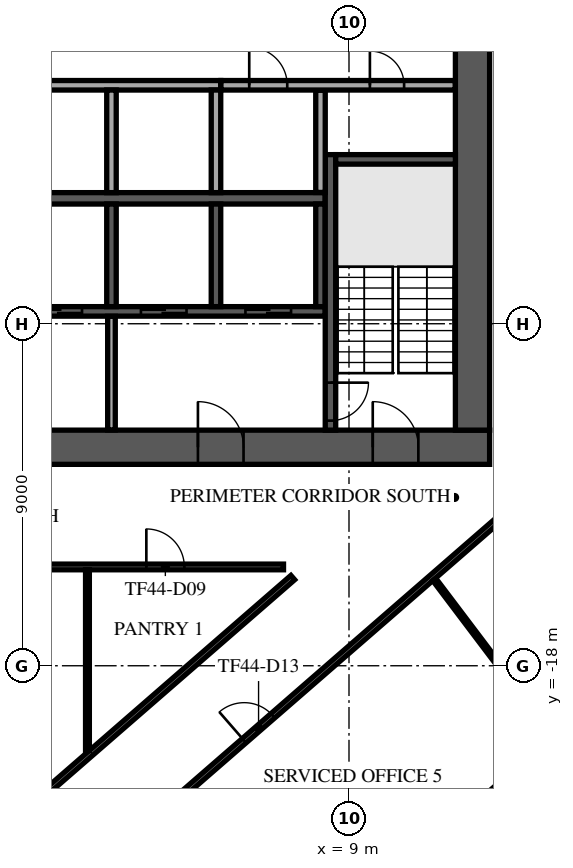
"""IFC4 building model, lengths in metres.
Left out: names, types, materials, properties, quantities, classifications, styles, units other than length and angle.
Written with IfcOpenShell. Run it as: python <this file> out.ifc"""

import sys

from ifc_helpers import new_model, si_unit, direction, frame, frame_2d, origin, place, context, subcontext, project, spatial, rectangle, extrude, element, fill, save


model = new_model("IFC4")
c1 = context("Model", 3, precision=1e-05, world=origin(), true_north=direction((0.0, 1.0)))
c2 = subcontext(c1, "Body", "Model", "MODEL_VIEW")
j1 = project(units=[si_unit("LENGTHUNIT", "METRE"), si_unit("PLANEANGLEUNIT", "RADIAN")], contexts=[c1])
p1 = place(None, origin())
s1 = spatial("IfcSite", under=j1, at=p1, CompositionType="ELEMENT")
p2 = place(p1, origin())
s2 = spatial("IfcBuilding", under=s1, at=p2, CompositionType="ELEMENT")
p3 = place(p2, frame((0.0, 0.0, 193.3)))
s3 = spatial("IfcBuildingStorey", under=s2, at=p3, CompositionType="ELEMENT", Elevation=193.3)
p4 = place(p3, frame((-12.7, -12.25, 0.0), z_axis=(0.0, 0.0, 1.0), x_axis=(1.0, 0.0, 0.0)))
e1 = element("IfcWall", 1, at=p4, inside=s3, PredefinedType="SHEAR", context=c2, shape_type="SweptSolid", body=[
    extrude(rectangle(XDim=25.4, YDim=0.9, at=frame_2d((12.7, 0.0))), origin(), (0.0, 0.0, 1.0), 3.62),
])
p5 = place(p4, frame((7.6, 0.0, 0.0)))
e2 = element("IfcOpeningElement", 2, at=p5, cuts=e1, PredefinedType="OPENING", context=c2, shape_type="SweptSolid", body=[
    extrude(rectangle(XDim=2.0, YDim=2.1, at=frame_2d((1.0, 1.05))), frame((0.0, 0.46, 0.0), z_axis=(0.0, -1.0, 0.0), x_axis=(1.0, 0.0, 0.0)), (0.0, 0.0, 1.0), 0.92),
])
p6 = place(p4, frame((17.725, 0.0, 0.0)))
e3 = element("IfcOpeningElement", 3, at=p6, cuts=e1, PredefinedType="OPENING", context=c2, shape_type="SweptSolid", body=[
    extrude(rectangle(XDim=1.2, YDim=2.1, at=frame_2d((0.6, 1.05))), frame((0.0, 0.46, 0.0), z_axis=(0.0, -1.0, 0.0), x_axis=(1.0, 0.0, 0.0)), (0.0, 0.0, 1.0), 0.92),
])
p7 = place(p4, frame((1.875, 0.0, 0.0)))
e4 = element("IfcOpeningElement", 4, at=p7, cuts=e1, PredefinedType="OPENING", context=c2, shape_type="SweptSolid", body=[
    extrude(rectangle(XDim=1.2, YDim=2.1, at=frame_2d((0.6, 1.05))), frame((0.0, 0.46, 0.0), z_axis=(0.0, -1.0, 0.0), x_axis=(1.0, 0.0, 0.0)), (0.0, 0.0, 1.0), 0.92),
])
p8 = place(p4, frame((22.325, 0.0, 0.0)))
e5 = element("IfcOpeningElement", 5, at=p8, cuts=e1, PredefinedType="OPENING", context=c2, shape_type="SweptSolid", body=[
    extrude(rectangle(XDim=1.2, YDim=2.1, at=frame_2d((0.6, 1.05))), frame((0.0, 0.46, 0.0), z_axis=(0.0, -1.0, 0.0), x_axis=(1.0, 0.0, 0.0)), (0.0, 0.0, 1.0), 0.92),
])
p9 = place(p3, frame((12.25, -11.8, 0.0), z_axis=(0.0, 0.0, 1.0), x_axis=(0.0, 1.0, 0.0)))
e6 = element("IfcWall", 6, at=p9, inside=s3, PredefinedType="SHEAR", context=c2, shape_type="SweptSolid", body=[
    extrude(rectangle(XDim=23.6, YDim=0.9, at=frame_2d((11.8, 0.0))), origin(), (0.0, 0.0, 1.0), 3.62),
])
p10 = place(p9, frame((10.6, 0.0, 0.0)))
e7 = element("IfcOpeningElement", 7, at=p10, cuts=e6, PredefinedType="OPENING", context=c2, shape_type="SweptSolid", body=[
    extrude(rectangle(XDim=2.4, YDim=2.4, at=frame_2d((1.2, 1.2))), frame((0.0, 0.46, 0.0), z_axis=(0.0, -1.0, 0.0), x_axis=(1.0, 0.0, 0.0)), (0.0, 0.0, 1.0), 0.92),
])
p11 = place(p3, frame((-2.875, -5.7, 0.0), z_axis=(0.0, 0.0, 1.0), x_axis=(1.0, 0.0, 0.0)))
e8 = element("IfcWall", 8, at=p11, inside=s3, PredefinedType="SOLIDWALL", context=c2, shape_type="SweptSolid", body=[
    extrude(rectangle(XDim=11.25, YDim=0.3, at=frame_2d((5.625, 0.0))), origin(), (0.0, 0.0, 1.0), 3.62),
])
p12 = place(p3, frame((-2.875, -2.725, 0.0), z_axis=(0.0, 0.0, 1.0), x_axis=(1.0, 0.0, 0.0)))
e9 = element("IfcWall", 9, at=p12, inside=s3, PredefinedType="SOLIDWALL", context=c2, shape_type="SweptSolid", body=[
    extrude(rectangle(XDim=8.5, YDim=0.25, at=frame_2d((4.25, 0.0))), origin(), (0.0, 0.0, 1.0), 3.62),
])
for number, where, z_axis, x_axis in (
    (10, (2.75, -5.55, 0.0), (0.0, 0.0, 1.0), (0.0, 1.0, 0.0)),
    (11, (5.5, -5.55, 0.0), (0.0, 0.0, 1.0), (0.0, 1.0, 0.0)),
):
    element("IfcWall", number, at=place(p3, frame(where, z_axis=z_axis, x_axis=x_axis)), inside=s3, PredefinedType="SOLIDWALL", context=c2, shape_type="SweptSolid", body=[
        extrude(rectangle(XDim=2.7, YDim=0.25, at=frame_2d((1.35, 0.0))), origin(), (0.0, 0.0, 1.0), 3.62),
    ])
p13 = place(p3, frame((-2.875, -8.675, 0.0), z_axis=(0.0, 0.0, 1.0), x_axis=(1.0, 0.0, 0.0)))
e12 = element("IfcWall", 12, at=p13, inside=s3, PredefinedType="SOLIDWALL", context=c2, shape_type="SweptSolid", body=[
    extrude(rectangle(XDim=11.25, YDim=0.25, at=frame_2d((5.625, 0.0))), origin(), (0.0, 0.0, 1.0), 3.62),
])
p14 = place(p13, frame((0.9, 0.0, 0.0)))
e13 = element("IfcOpeningElement", 13, at=p14, cuts=e12, PredefinedType="OPENING", context=c2, shape_type="SweptSolid", body=[
    extrude(rectangle(XDim=1.2, YDim=2.1, at=frame_2d((0.6, 1.05))), frame((0.0, 0.135, 0.0), z_axis=(0.0, -1.0, 0.0), x_axis=(1.0, 0.0, 0.0)), (0.0, 0.0, 1.0), 0.27),
])
p15 = place(p13, frame((3.65, 0.0, 0.0)))
e14 = element("IfcOpeningElement", 14, at=p15, cuts=e12, PredefinedType="OPENING", context=c2, shape_type="SweptSolid", body=[
    extrude(rectangle(XDim=1.2, YDim=2.1, at=frame_2d((0.6, 1.05))), frame((0.0, 0.135, 0.0), z_axis=(0.0, -1.0, 0.0), x_axis=(1.0, 0.0, 0.0)), (0.0, 0.0, 1.0), 0.27),
])
p16 = place(p13, frame((6.4, 0.0, 0.0)))
e15 = element("IfcOpeningElement", 15, at=p16, cuts=e12, PredefinedType="OPENING", context=c2, shape_type="SweptSolid", body=[
    extrude(rectangle(XDim=1.2, YDim=2.1, at=frame_2d((0.6, 1.05))), frame((0.0, 0.135, 0.0), z_axis=(0.0, -1.0, 0.0), x_axis=(1.0, 0.0, 0.0)), (0.0, 0.0, 1.0), 0.27),
])
p17 = place(p13, frame((9.15, 0.0, 0.0)))
e16 = element("IfcOpeningElement", 16, at=p17, cuts=e12, PredefinedType="OPENING", context=c2, shape_type="SweptSolid", body=[
    extrude(rectangle(XDim=1.2, YDim=2.1, at=frame_2d((0.6, 1.05))), frame((0.0, 0.135, 0.0), z_axis=(0.0, -1.0, 0.0), x_axis=(1.0, 0.0, 0.0)), (0.0, 0.0, 1.0), 0.27),
])
for number, where, z_axis, x_axis in (
    (17, (2.75, -8.55, 0.0), (0.0, 0.0, 1.0), (0.0, 1.0, 0.0)),
    (18, (5.5, -8.55, 0.0), (0.0, 0.0, 1.0), (0.0, 1.0, 0.0)),
    (19, (8.25, -8.55, 0.0), (0.0, 0.0, 1.0), (0.0, 1.0, 0.0)),
):
    element("IfcWall", number, at=place(p3, frame(where, z_axis=z_axis, x_axis=x_axis)), inside=s3, PredefinedType="SOLIDWALL", context=c2, shape_type="SweptSolid", body=[
        extrude(rectangle(XDim=2.7, YDim=0.25, at=frame_2d((1.35, 0.0))), origin(), (0.0, 0.0, 1.0), 3.62),
    ])
p18 = place(p3, frame((8.512, -4.55, 0.0), z_axis=(0.0, 0.0, 1.0), x_axis=(0.0, -1.0, 0.0)))
e20 = element("IfcWall", 20, at=p18, inside=s3, PredefinedType="SOLIDWALL", context=c2, shape_type="SweptSolid", body=[
    extrude(rectangle(XDim=7.25, YDim=0.275, at=frame_2d((3.625, 0.0))), origin(), (0.0, 0.0, 1.0), 3.62),
])
p19 = place(p18, frame((6.0, 0.0, 0.0)))
e21 = element("IfcOpeningElement", 21, at=p19, cuts=e20, PredefinedType="OPENING", context=c2, shape_type="SweptSolid", body=[
    extrude(rectangle(XDim=1.0, YDim=2.1, at=frame_2d((0.5, 1.05))), frame((0.0, 0.147, 0.0), z_axis=(0.0, -1.0, 0.0), x_axis=(1.0, 0.0, 0.0)), (0.0, 0.0, 1.0), 0.295),
])
p20 = place(p3, frame((8.65, -4.675, 0.0), z_axis=(0.0, 0.0, 1.0), x_axis=(1.0, 0.0, 0.0)))
e22 = element("IfcWall", 22, at=p20, inside=s3, PredefinedType="SOLIDWALL", context=c2, shape_type="SweptSolid", body=[
    extrude(rectangle(XDim=3.15, YDim=0.25, at=frame_2d((1.575, 0.0))), origin(), (0.0, 0.0, 1.0), 3.62),
])
p21 = place(p3, frame((2.75, -11.795, 0.0), z_axis=(0.0, 0.0, 1.0), x_axis=(0.0, 1.0, 0.0)))
e23 = element("IfcWall", 23, at=p21, inside=s3, PredefinedType="PARTITIONING", context=c2, shape_type="SweptSolid", body=[
    extrude(rectangle(XDim=2.99, YDim=0.2, at=frame_2d((1.495, 0.0))), origin(), (0.0, 0.0, 1.0), 3.62),
])
p22 = place(p3, frame((8.25, -5.545, 0.0), z_axis=(0.0, 0.0, 1.0), x_axis=(0.0, 1.0, 0.0)))
e24 = element("IfcWall", 24, at=p22, inside=s3, PredefinedType="PARTITIONING", context=c2, shape_type="SweptSolid", body=[
    extrude(rectangle(XDim=2.69, YDim=0.25, at=frame_2d((1.345, 0.0))), origin(), (0.0, 0.0, 1.0), 3.62),
])
p23 = place(p3, frame((5.63, -2.725, 0.0), z_axis=(0.0, 0.0, 1.0), x_axis=(1.0, 0.0, 0.0)))
e25 = element("IfcWall", 25, at=p23, inside=s3, PredefinedType="PARTITIONING", context=c2, shape_type="SweptSolid", body=[
    extrude(rectangle(XDim=6.165, YDim=0.25, at=frame_2d((3.083, 0.0))), origin(), (0.0, 0.0, 1.0), 3.62),
])
p24 = place(p23, frame((0.745, 0.0, 0.0)))
e26 = element("IfcOpeningElement", 26, at=p24, cuts=e25, PredefinedType="OPENING", context=c2, shape_type="SweptSolid", body=[
    extrude(rectangle(XDim=1.0, YDim=2.1, at=frame_2d((0.5, 1.05))), frame((0.0, 0.135, 0.0), z_axis=(0.0, -1.0, 0.0), x_axis=(1.0, 0.0, 0.0)), (0.0, 0.0, 1.0), 0.27),
])
p25 = place(p23, frame((3.92, 0.0, 0.0)))
e27 = element("IfcOpeningElement", 27, at=p25, cuts=e25, PredefinedType="OPENING", context=c2, shape_type="SweptSolid", body=[
    extrude(rectangle(XDim=0.9, YDim=2.1, at=frame_2d((0.45, 1.05))), frame((0.0, 0.135, 0.0), z_axis=(0.0, -1.0, 0.0), x_axis=(1.0, 0.0, 0.0)), (0.0, 0.0, 1.0), 0.27),
])
p26 = place(p3, frame((-2.286, -34.715, 0.0), z_axis=(0.0, 0.0, 1.0), x_axis=(0.754708272811, 0.656060532993, 0.0)))
e28 = element("IfcWall", 28, at=p26, inside=s3, PredefinedType="STANDARD", context=c2, shape_type="SweptSolid", body=[
    extrude(rectangle(XDim=49.0, YDim=0.6, at=frame_2d((24.5, 0.0))), origin(), (0.0, 0.0, 1.0), 3.62),
])
p27 = place(p26, frame((1.227, 0.0, 0.9)))
e29 = element("IfcOpeningElement", 29, at=p27, cuts=e28, PredefinedType="OPENING", context=c2, shape_type="SweptSolid", body=[
    extrude(rectangle(XDim=2.0, YDim=2.1, at=frame_2d((1.0, 1.05))), frame((0.0, 0.31, 0.0), z_axis=(0.0, -1.0, 0.0), x_axis=(1.0, 0.0, 0.0)), (0.0, 0.0, 1.0), 0.62),
])
p28 = place(p26, frame((5.682, 0.0, 0.9)))
e30 = element("IfcOpeningElement", 30, at=p28, cuts=e28, PredefinedType="OPENING", context=c2, shape_type="SweptSolid", body=[
    extrude(rectangle(XDim=2.0, YDim=2.1, at=frame_2d((1.0, 1.05))), frame((0.0, 0.31, 0.0), z_axis=(0.0, -1.0, 0.0), x_axis=(1.0, 0.0, 0.0)), (0.0, 0.0, 1.0), 0.62),
])
p29 = place(p26, frame((10.136, 0.0, 0.9)))
e31 = element("IfcOpeningElement", 31, at=p29, cuts=e28, PredefinedType="OPENING", context=c2, shape_type="SweptSolid", body=[
    extrude(rectangle(XDim=2.0, YDim=2.1, at=frame_2d((1.0, 1.05))), frame((0.0, 0.31, 0.0), z_axis=(0.0, -1.0, 0.0), x_axis=(1.0, 0.0, 0.0)), (0.0, 0.0, 1.0), 0.62),
])
p30 = place(p26, frame((14.591, 0.0, 0.9)))
e32 = element("IfcOpeningElement", 32, at=p30, cuts=e28, PredefinedType="OPENING", context=c2, shape_type="SweptSolid", body=[
    extrude(rectangle(XDim=2.0, YDim=2.1, at=frame_2d((1.0, 1.05))), frame((0.0, 0.31, 0.0), z_axis=(0.0, -1.0, 0.0), x_axis=(1.0, 0.0, 0.0)), (0.0, 0.0, 1.0), 0.62),
])
p31 = place(p26, frame((19.045, 0.0, 0.9)))
e33 = element("IfcOpeningElement", 33, at=p31, cuts=e28, PredefinedType="OPENING", context=c2, shape_type="SweptSolid", body=[
    extrude(rectangle(XDim=2.0, YDim=2.1, at=frame_2d((1.0, 1.05))), frame((0.0, 0.31, 0.0), z_axis=(0.0, -1.0, 0.0), x_axis=(1.0, 0.0, 0.0)), (0.0, 0.0, 1.0), 0.62),
])
p32 = place(p26, frame((23.5, 0.0, 0.9)))
e34 = element("IfcOpeningElement", 34, at=p32, cuts=e28, PredefinedType="OPENING", context=c2, shape_type="SweptSolid", body=[
    extrude(rectangle(XDim=2.0, YDim=2.1, at=frame_2d((1.0, 1.05))), frame((0.0, 0.31, 0.0), z_axis=(0.0, -1.0, 0.0), x_axis=(1.0, 0.0, 0.0)), (0.0, 0.0, 1.0), 0.62),
])
p33 = place(p26, frame((27.955, 0.0, 0.9)))
e35 = element("IfcOpeningElement", 35, at=p33, cuts=e28, PredefinedType="OPENING", context=c2, shape_type="SweptSolid", body=[
    extrude(rectangle(XDim=2.0, YDim=2.1, at=frame_2d((1.0, 1.05))), frame((0.0, 0.31, 0.0), z_axis=(0.0, -1.0, 0.0), x_axis=(1.0, 0.0, 0.0)), (0.0, 0.0, 1.0), 0.62),
])
p34 = place(p26, frame((32.409, 0.0, 0.9)))
e36 = element("IfcOpeningElement", 36, at=p34, cuts=e28, PredefinedType="OPENING", context=c2, shape_type="SweptSolid", body=[
    extrude(rectangle(XDim=2.0, YDim=2.1, at=frame_2d((1.0, 1.05))), frame((0.0, 0.31, 0.0), z_axis=(0.0, -1.0, 0.0), x_axis=(1.0, 0.0, 0.0)), (0.0, 0.0, 1.0), 0.62),
])
p35 = place(p26, frame((36.864, 0.0, 0.9)))
e37 = element("IfcOpeningElement", 37, at=p35, cuts=e28, PredefinedType="OPENING", context=c2, shape_type="SweptSolid", body=[
    extrude(rectangle(XDim=2.0, YDim=2.1, at=frame_2d((1.0, 1.05))), frame((0.0, 0.31, 0.0), z_axis=(0.0, -1.0, 0.0), x_axis=(1.0, 0.0, 0.0)), (0.0, 0.0, 1.0), 0.62),
])
p36 = place(p26, frame((41.318, 0.0, 0.9)))
e38 = element("IfcOpeningElement", 38, at=p36, cuts=e28, PredefinedType="OPENING", context=c2, shape_type="SweptSolid", body=[
    extrude(rectangle(XDim=2.0, YDim=2.1, at=frame_2d((1.0, 1.05))), frame((0.0, 0.31, 0.0), z_axis=(0.0, -1.0, 0.0), x_axis=(1.0, 0.0, 0.0)), (0.0, 0.0, 1.0), 0.62),
])
p37 = place(p26, frame((45.773, 0.0, 0.9)))
e39 = element("IfcOpeningElement", 39, at=p37, cuts=e28, PredefinedType="OPENING", context=c2, shape_type="SweptSolid", body=[
    extrude(rectangle(XDim=2.0, YDim=2.1, at=frame_2d((1.0, 1.05))), frame((0.0, 0.31, 0.0), z_axis=(0.0, -1.0, 0.0), x_axis=(1.0, 0.0, 0.0)), (0.0, 0.0, 1.0), 0.62),
])
p38 = place(p3, frame((-10.486, -15.4, 0.0), z_axis=(0.0, 0.0, 1.0), x_axis=(1.0, 0.0, 0.0)))
e40 = element("IfcWall", 40, at=p38, inside=s3, PredefinedType="PARTITIONING", context=c2, shape_type="SweptSolid", body=[
    extrude(rectangle(XDim=17.763, YDim=0.15, at=frame_2d((8.882, 0.0))), origin(), (0.0, 0.0, 1.0), 3.17),
])
p39 = place(p38, frame((14.154, 0.0, 0.0)))
e41 = element("IfcOpeningElement", 41, at=p39, cuts=e40, PredefinedType="OPENING", context=c2, shape_type="SweptSolid", body=[
    extrude(rectangle(XDim=1.0, YDim=2.1, at=frame_2d((0.5, 1.05))), frame((0.0, 0.085, 0.0), z_axis=(0.0, -1.0, 0.0), x_axis=(1.0, 0.0, 0.0)), (0.0, 0.0, 1.0), 0.17),
])
p40 = place(p3, frame((-2.631, -24.505, 0.0), z_axis=(0.0, 0.0, 1.0), x_axis=(0.754714526528, 0.656053338874, 0.0)))
e42 = element("IfcWall", 42, at=p40, inside=s3, PredefinedType="PARTITIONING", context=c2, shape_type="SweptSolid", body=[
    extrude(rectangle(XDim=13.452, YDim=0.15, at=frame_2d((6.726, 0.0))), origin(), (0.0, 0.0, 1.0), 3.17),
])
p41 = place(p40, frame((3.05, 0.0, 0.0)))
e43 = element("IfcOpeningElement", 43, at=p41, cuts=e42, PredefinedType="OPENING", context=c2, shape_type="SweptSolid", body=[
    extrude(rectangle(XDim=1.0, YDim=2.1, at=frame_2d((0.5, 1.05))), frame((0.0, 0.085, 0.0), z_axis=(0.0, -1.0, 0.0), x_axis=(1.0, 0.0, 0.0)), (0.0, 0.0, 1.0), 0.17),
])
p42 = place(p3, frame((-1.0, -26.268, 0.0), z_axis=(0.0, 0.0, 1.0), x_axis=(0.754711356604, 0.656056985492, 0.0)))
e44 = element("IfcWall", 44, at=p42, inside=s3, PredefinedType="PARTITIONING", context=c2, shape_type="SweptSolid", body=[
    extrude(rectangle(XDim=36.052, YDim=0.15, at=frame_2d((18.026, 0.0))), origin(), (0.0, 0.0, 1.0), 3.17),
])
p43 = place(p42, frame((9.598, 0.0, 0.0)))
e45 = element("IfcOpeningElement", 45, at=p43, cuts=e44, PredefinedType="OPENING", context=c2, shape_type="SweptSolid", body=[
    extrude(rectangle(XDim=1.0, YDim=2.1, at=frame_2d((0.5, 1.05))), frame((0.0, 0.085, 0.0), z_axis=(0.0, -1.0, 0.0), x_axis=(1.0, 0.0, 0.0)), (0.0, 0.0, 1.0), 0.17),
])
p44 = place(p42, frame((20.957, 0.0, 0.0)))
e46 = element("IfcOpeningElement", 46, at=p44, cuts=e44, PredefinedType="OPENING", context=c2, shape_type="SweptSolid", body=[
    extrude(rectangle(XDim=1.0, YDim=2.1, at=frame_2d((0.5, 1.05))), frame((0.0, 0.085, 0.0), z_axis=(0.0, -1.0, 0.0), x_axis=(1.0, 0.0, 0.0)), (0.0, 0.0, 1.0), 0.17),
])
p45 = place(p42, frame((27.87, 0.0, 0.0)))
e47 = element("IfcOpeningElement", 47, at=p45, cuts=e44, PredefinedType="OPENING", context=c2, shape_type="SweptSolid", body=[
    extrude(rectangle(XDim=1.8, YDim=2.1, at=frame_2d((0.9, 1.05))), frame((0.0, 0.085, 0.0), z_axis=(0.0, -1.0, 0.0), x_axis=(1.0, 0.0, 0.0)), (0.0, 0.0, 1.0), 0.17),
])
p46 = place(p3, frame((2.118, -20.234, 0.0), z_axis=(0.0, 0.0, 1.0), x_axis=(0.0, 1.0, 0.0)))
e48 = element("IfcWall", 48, at=p46, inside=s3, PredefinedType="PARTITIONING", context=c2, shape_type="SweptSolid", body=[
    extrude(rectangle(XDim=4.759, YDim=0.1, at=frame_2d((2.379, 0.0))), origin(), (0.0, 0.0, 1.0), 3.17),
])
p47 = place(p3, frame((11.243, -15.729, 0.0), z_axis=(0.0, 0.0, 1.0), x_axis=(0.602848474471, -0.797855699251, 0.0)))
e49 = element("IfcWall", 49, at=p47, inside=s3, PredefinedType="PARTITIONING", context=c2, shape_type="SweptSolid", body=[
    extrude(rectangle(XDim=5.163, YDim=0.1, at=frame_2d((2.582, 0.0))), origin(), (0.0, 0.0, 1.0), 3.17),
])
p48 = place(p6, origin())
e50 = element("IfcDoor", 50, at=p48, inside=s3, OperationType="SINGLE_SWING_LEFT", PredefinedType="DOOR", context=c2, shape_type="SweptSolid", body=[
    extrude(rectangle(XDim=1.2, YDim=2.1, at=frame_2d((0.6, 1.05))), frame((0.0, 0.025, 0.0), z_axis=(0.0, -1.0, 0.0), x_axis=(1.0, 0.0, 0.0)), (0.0, 0.0, 1.0), 0.05),
])
fill(e3, e50)
p49 = place(p8, origin())
e51 = element("IfcDoor", 51, at=p49, inside=s3, OperationType="SINGLE_SWING_LEFT", PredefinedType="DOOR", context=c2, shape_type="SweptSolid", body=[
    extrude(rectangle(XDim=1.2, YDim=2.1, at=frame_2d((0.6, 1.05))), frame((0.0, 0.025, 0.0), z_axis=(0.0, -1.0, 0.0), x_axis=(1.0, 0.0, 0.0)), (0.0, 0.0, 1.0), 0.05),
])
fill(e5, e51)
p50 = place(p15, origin())
e52 = element("IfcDoor", 52, at=p50, inside=s3, OperationType="DOUBLE_DOOR_SLIDING", PredefinedType="DOOR", context=c2, shape_type="SweptSolid", body=[
    extrude(rectangle(XDim=1.2, YDim=2.1, at=frame_2d((0.6, 1.05))), frame((0.0, 0.025, 0.0), z_axis=(0.0, -1.0, 0.0), x_axis=(1.0, 0.0, 0.0)), (0.0, 0.0, 1.0), 0.05),
])
fill(e14, e52)
p51 = place(p16, origin())
e53 = element("IfcDoor", 53, at=p51, inside=s3, OperationType="DOUBLE_DOOR_SLIDING", PredefinedType="DOOR", context=c2, shape_type="SweptSolid", body=[
    extrude(rectangle(XDim=1.2, YDim=2.1, at=frame_2d((0.6, 1.05))), frame((0.0, 0.025, 0.0), z_axis=(0.0, -1.0, 0.0), x_axis=(1.0, 0.0, 0.0)), (0.0, 0.0, 1.0), 0.05),
])
fill(e15, e53)
p52 = place(p17, origin())
e54 = element("IfcDoor", 54, at=p52, inside=s3, OperationType="DOUBLE_DOOR_SLIDING", PredefinedType="DOOR", context=c2, shape_type="SweptSolid", body=[
    extrude(rectangle(XDim=1.2, YDim=2.1, at=frame_2d((0.6, 1.05))), frame((0.0, 0.025, 0.0), z_axis=(0.0, -1.0, 0.0), x_axis=(1.0, 0.0, 0.0)), (0.0, 0.0, 1.0), 0.05),
])
fill(e16, e54)
p53 = place(p19, origin())
e55 = element("IfcDoor", 55, at=p53, inside=s3, OperationType="SINGLE_SWING_LEFT", PredefinedType="DOOR", context=c2, shape_type="SweptSolid", body=[
    extrude(rectangle(XDim=1.0, YDim=2.1, at=frame_2d((0.5, 1.05))), frame((0.0, 0.025, 0.0), z_axis=(0.0, -1.0, 0.0), x_axis=(1.0, 0.0, 0.0)), (0.0, 0.0, 1.0), 0.05),
])
fill(e21, e55)
p54 = place(p24, origin())
e56 = element("IfcDoor", 56, at=p54, inside=s3, OperationType="SINGLE_SWING_RIGHT", PredefinedType="DOOR", context=c2, shape_type="SweptSolid", body=[
    extrude(rectangle(XDim=1.0, YDim=2.1, at=frame_2d((0.5, 1.05))), frame((0.0, 0.025, 0.0), z_axis=(0.0, -1.0, 0.0), x_axis=(1.0, 0.0, 0.0)), (0.0, 0.0, 1.0), 0.05),
])
fill(e26, e56)
p55 = place(p25, origin())
e57 = element("IfcDoor", 57, at=p55, inside=s3, OperationType="SINGLE_SWING_RIGHT", PredefinedType="DOOR", context=c2, shape_type="SweptSolid", body=[
    extrude(rectangle(XDim=0.9, YDim=2.1, at=frame_2d((0.45, 1.05))), frame((0.0, 0.025, 0.0), z_axis=(0.0, -1.0, 0.0), x_axis=(1.0, 0.0, 0.0)), (0.0, 0.0, 1.0), 0.05),
])
fill(e27, e57)
p56 = place(p31, origin())
e58 = element("IfcWindow", 58, at=p56, inside=s3, PartitioningType="SINGLE_PANEL", PredefinedType="WINDOW", context=c2, shape_type="SweptSolid", body=[
    extrude(rectangle(XDim=2.0, YDim=2.1, at=frame_2d((1.0, 1.05))), frame((0.0, 0.03, 0.0), z_axis=(0.0, -1.0, 0.0), x_axis=(1.0, 0.0, 0.0)), (0.0, 0.0, 1.0), 0.06),
])
fill(e33, e58)
p57 = place(p39, frame((1.0, 0.0, 0.0), z_axis=(0.0, 0.0, 1.0), x_axis=(-1.0, 0.0, 0.0)))
e59 = element("IfcDoor", 59, at=p57, inside=s3, OperationType="SINGLE_SWING_LEFT", PredefinedType="DOOR", context=c2, shape_type="SweptSolid", body=[
    extrude(rectangle(XDim=1.0, YDim=2.1, at=frame_2d((0.5, 1.05))), frame((0.0, 0.025, 0.0), z_axis=(0.0, -1.0, 0.0), x_axis=(1.0, 0.0, 0.0)), (0.0, 0.0, 1.0), 0.05),
])
fill(e41, e59)
p58 = place(p43, frame((1.0, 0.0, 0.0), z_axis=(0.0, 0.0, 1.0), x_axis=(-1.0, 0.0, 0.0)))
e60 = element("IfcDoor", 60, at=p58, inside=s3, OperationType="SINGLE_SWING_LEFT", PredefinedType="DOOR", context=c2, shape_type="SweptSolid", body=[
    extrude(rectangle(XDim=1.0, YDim=2.1, at=frame_2d((0.5, 1.05))), frame((0.0, 0.025, 0.0), z_axis=(0.0, -1.0, 0.0), x_axis=(1.0, 0.0, 0.0)), (0.0, 0.0, 1.0), 0.05),
])
fill(e45, e60)
save(model, sys.argv[1])
